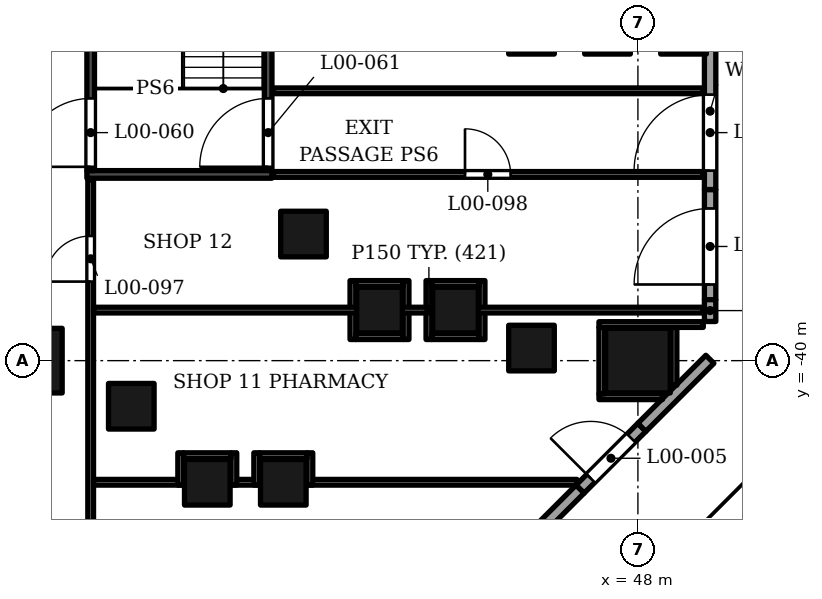
"""IFC4 building model, lengths in metres.
Left out: names, types, materials, properties, quantities, classifications, styles, units other than length and angle.
Written with IfcOpenShell. Run it as: python <this file> out.ifc"""

import sys

from ifc_helpers import new_model, si_unit, direction, frame, frame_2d, origin, origin_2d, place, context, subcontext, project, spatial, rectangle, extrude, element, fill, save


model = new_model("IFC4")
c1 = context("Model", 3, precision=1e-05, world=origin(), true_north=direction((0.0, 1.0)))
c2 = subcontext(c1, "Body", "Model", "MODEL_VIEW")
j1 = project(units=[si_unit("LENGTHUNIT", "METRE"), si_unit("PLANEANGLEUNIT", "RADIAN")], contexts=[c1])
p1 = place(None, origin())
s1 = spatial("IfcSite", under=j1, at=p1, CompositionType="ELEMENT")
p2 = place(p1, origin())
s2 = spatial("IfcBuilding", under=s1, at=p2, CompositionType="ELEMENT")
p3 = place(p2, origin())
s3 = spatial("IfcBuildingStorey", under=s2, at=p3, CompositionType="ELEMENT", Elevation=0.0)
for number, where, z_axis, x_axis in (
    (1, (32.0, -40.0, 0.0), (0.0, 0.0, 1.0), (1.0, 0.0, 0.0)),
    (2, (48.0, -40.0, 0.0), (0.0, 0.0, 1.0), (1.0, 0.0, 0.0)),
):
    element("IfcColumn", number, at=place(p3, frame(where, z_axis=z_axis, x_axis=x_axis)), inside=s3, PredefinedType="COLUMN", context=c2, shape_type="SweptSolid", body=[
        extrude(rectangle(XDim=1.7, YDim=1.7, at=origin_2d()), origin(), (0.0, 0.0, 1.0), 9.0),
    ])
for number, where, z_axis, x_axis in (
    (3, (39.2, -36.669, 0.0), (0.0, 0.0, 1.0), (1.0, 0.0, 0.0)),
    (4, (34.669, -41.2, 0.0), (0.0, 0.0, 1.0), (1.0, 0.0, 0.0)),
    (5, (41.2, -38.669, 0.0), (0.0, 0.0, 1.0), (1.0, 0.0, 0.0)),
    (6, (36.669, -43.2, 0.0), (0.0, 0.0, 1.0), (1.0, 0.0, 0.0)),
    (7, (43.2, -38.669, 0.0), (0.0, 0.0, 1.0), (1.0, 0.0, 0.0)),
    (8, (38.669, -43.2, 0.0), (0.0, 0.0, 1.0), (1.0, 0.0, 0.0)),
    (9, (45.2, -39.669, 0.0), (0.0, 0.0, 1.0), (1.0, 0.0, 0.0)),
    (10, (45.2, -31.333, 0.0), (0.0, 0.0, 1.0), (1.0, 0.0, 0.0)),
    (11, (47.2, -31.333, 0.0), (0.0, 0.0, 1.0), (1.0, 0.0, 0.0)),
    (12, (49.2, -31.333, 0.0), (0.0, 0.0, 1.0), (1.0, 0.0, 0.0)),
):
    element("IfcColumn", number, at=place(p3, frame(where, z_axis=z_axis, x_axis=x_axis)), inside=s3, PredefinedType="COLUMN", context=c2, shape_type="SweptSolid", body=[
        extrude(rectangle(XDim=1.2, YDim=1.2, at=origin_2d()), origin(), (0.0, 0.0, 1.0), 9.0),
    ])
p4 = place(p3, frame((46.477, -43.381, 0.0), z_axis=(0.0, 0.0, 1.0), x_axis=(0.707159853336, 0.707053705054, 0.0)))
e13 = element("IfcWall", 13, at=p4, inside=s3, PredefinedType="ELEMENTEDWALL", context=c2, shape_type="SweptSolid", body=[
    extrude(rectangle(XDim=2.3, YDim=0.3, at=frame_2d((1.15, 0.0))), origin(), (0.0, 0.0, 1.0), 7.6),
])
p5 = place(p4, frame((0.4, 0.0, 0.0)))
e14 = element("IfcOpeningElement", 14, at=p5, cuts=e13, PredefinedType="OPENING", context=c2, shape_type="SweptSolid", body=[
    extrude(rectangle(XDim=1.5, YDim=2.7, at=frame_2d((0.75, 1.35))), frame((0.0, 0.16, 0.0), z_axis=(0.0, -1.0, 0.0), x_axis=(1.0, 0.0, 0.0)), (0.0, 0.0, 1.0), 0.32),
])
p6 = place(p3, frame((44.271, -45.588, 0.0), z_axis=(0.0, 0.0, 1.0), x_axis=(0.707067655068, 0.70714590514, 0.0)))
e15 = element("IfcWall", 15, at=p6, inside=s3, PredefinedType="SOLIDWALL", context=c2, shape_type="SweptSolid", body=[
    extrude(rectangle(XDim=3.12, YDim=0.3, at=frame_2d((1.56, 0.0))), origin(), (0.0, 0.0, 1.0), 7.6),
])
p7 = place(p3, frame((48.104, -41.755, 0.0), z_axis=(0.0, 0.0, 1.0), x_axis=(0.707106781187, 0.707106781187, 0.0)))
e16 = element("IfcWall", 16, at=p7, inside=s3, PredefinedType="SOLIDWALL", context=c2, shape_type="SweptSolid", body=[
    extrude(rectangle(XDim=2.532, YDim=0.3, at=frame_2d((1.266, 0.0))), origin(), (0.0, 0.0, 1.0), 7.6),
])
p8 = place(p3, frame((49.9, -38.396, 0.0), z_axis=(0.0, 0.0, 1.0), x_axis=(0.0, 1.0, 0.0)))
e17 = element("IfcWall", 17, at=p8, inside=s3, PredefinedType="ELEMENTEDWALL", context=c2, shape_type="SweptSolid", body=[
    extrude(rectangle(XDim=2.898, YDim=0.3, at=frame_2d((1.449, 0.0))), origin(), (0.0, 0.0, 1.0), 7.6),
])
p9 = place(p8, frame((0.4, 0.0, 0.0)))
e18 = element("IfcOpeningElement", 18, at=p9, cuts=e17, PredefinedType="OPENING", context=c2, shape_type="SweptSolid", body=[
    extrude(rectangle(XDim=2.0, YDim=2.7, at=frame_2d((1.0, 1.35))), frame((0.0, 0.16, 0.0), z_axis=(0.0, -1.0, 0.0), x_axis=(1.0, 0.0, 0.0)), (0.0, 0.0, 1.0), 0.32),
])
p10 = place(p3, frame((49.9, -35.498, 0.0), z_axis=(0.0, 0.0, 1.0), x_axis=(0.0, 1.0, 0.0)))
e19 = element("IfcWall", 19, at=p10, inside=s3, PredefinedType="ELEMENTEDWALL", context=c2, shape_type="SweptSolid", body=[
    extrude(rectangle(XDim=4.125, YDim=0.3, at=frame_2d((2.062, 0.0))), origin(), (0.0, 0.0, 1.0), 7.6),
])
p11 = place(p10, frame((0.498, 0.0, 0.0)))
e20 = element("IfcOpeningElement", 20, at=p11, cuts=e19, PredefinedType="OPENING", context=c2, shape_type="SweptSolid", body=[
    extrude(rectangle(XDim=2.0, YDim=2.4, at=frame_2d((1.0, 1.2))), frame((0.0, 0.16, 0.0), z_axis=(0.0, -1.0, 0.0), x_axis=(1.0, 0.0, 0.0)), (0.0, 0.0, 1.0), 0.32),
])
p12 = place(p3, frame((49.9, -38.97, 0.0), z_axis=(0.0, 0.0, 1.0), x_axis=(0.0, 1.0, 0.0)))
e21 = element("IfcWall", 21, at=p12, inside=s3, PredefinedType="SOLIDWALL", context=c2, shape_type="SweptSolid", body=[
    extrude(rectangle(XDim=0.574, YDim=0.3, at=frame_2d((0.287, 0.0))), origin(), (0.0, 0.0, 1.0), 7.6),
])
p13 = place(p3, frame((44.042, -45.745, 9.0), z_axis=(0.0, 0.0, 1.0), x_axis=(0.7071215324, 0.707092029666, 0.0)))
e22 = element("IfcWall", 22, at=p13, inside=s3, PredefinedType="PARAPET", context=c2, shape_type="SweptSolid", body=[
    extrude(rectangle(XDim=8.275, YDim=0.3, at=frame_2d((4.138, 0.0))), origin(), (0.0, 0.0, 1.0), 1.1),
])
p14 = place(p3, frame((49.85, -39.79, 9.0), z_axis=(0.0, 0.0, 1.0), x_axis=(0.0, 1.0, 0.0)))
e23 = element("IfcWall", 23, at=p14, inside=s3, PredefinedType="PARAPET", context=c2, shape_type="SweptSolid", body=[
    extrude(rectangle(XDim=14.698, YDim=0.3, at=frame_2d((7.349, 0.0))), origin(), (0.0, 0.0, 1.0), 1.1),
])
p15 = place(p3, frame((33.5, -35.1, 0.0), z_axis=(0.0, 0.0, 1.0), x_axis=(1.0, 0.0, 0.0)))
e24 = element("IfcWall", 24, at=p15, inside=s3, PredefinedType="SOLIDWALL", context=c2, shape_type="SweptSolid", body=[
    extrude(rectangle(XDim=4.87, YDim=0.2, at=frame_2d((2.435, 0.0))), origin(), (0.0, 0.0, 1.0), 8.5),
])
p16 = place(p3, frame((33.6, -35.0, 0.0), z_axis=(0.0, 0.0, 1.0), x_axis=(0.0, 1.0, 0.0)))
e25 = element("IfcWall", 25, at=p16, inside=s3, PredefinedType="SOLIDWALL", context=c2, shape_type="SweptSolid", body=[
    extrude(rectangle(XDim=6.65, YDim=0.2, at=frame_2d((3.325, 0.0))), origin(), (0.0, 0.0, 1.0), 8.5),
])
p17 = place(p16, frame((0.1, 0.0, 0.0)))
e26 = element("IfcOpeningElement", 26, at=p17, cuts=e25, PredefinedType="OPENING", context=c2, shape_type="SweptSolid", body=[
    extrude(rectangle(XDim=1.8, YDim=2.4, at=frame_2d((0.9, 1.2))), frame((0.0, 0.11, 0.0), z_axis=(0.0, -1.0, 0.0), x_axis=(1.0, 0.0, 0.0)), (0.0, 0.0, 1.0), 0.22),
])
p18 = place(p3, frame((38.27, -35.0, 0.0), z_axis=(0.0, 0.0, 1.0), x_axis=(0.0, 1.0, 0.0)))
e27 = element("IfcWall", 27, at=p18, inside=s3, PredefinedType="SOLIDWALL", context=c2, shape_type="SweptSolid", body=[
    extrude(rectangle(XDim=6.65, YDim=0.2, at=frame_2d((3.325, 0.0))), origin(), (0.0, 0.0, 1.0), 8.5),
])
p19 = place(p18, frame((0.1, 0.0, 0.0)))
e28 = element("IfcOpeningElement", 28, at=p19, cuts=e27, PredefinedType="OPENING", context=c2, shape_type="SweptSolid", body=[
    extrude(rectangle(XDim=1.8, YDim=2.4, at=frame_2d((0.9, 1.2))), frame((0.0, 0.11, 0.0), z_axis=(0.0, -1.0, 0.0), x_axis=(1.0, 0.0, 0.0)), (0.0, 0.0, 1.0), 0.22),
])
p20 = place(p3, frame((33.6, -44.6, 0.0), z_axis=(0.0, 0.0, 1.0), x_axis=(0.0, 1.0, 0.0)))
e29 = element("IfcWall", 29, at=p20, inside=s3, PredefinedType="PARTITIONING", context=c2, shape_type="SweptSolid", body=[
    extrude(rectangle(XDim=9.36, YDim=0.15, at=frame_2d((4.68, 0.0))), origin(), (0.0, 0.0, 1.0), 7.3),
])
p21 = place(p20, frame((6.68, 0.0, 0.0)))
e30 = element("IfcOpeningElement", 30, at=p21, cuts=e29, PredefinedType="OPENING", context=c2, shape_type="SweptSolid", body=[
    extrude(rectangle(XDim=1.2, YDim=2.1, at=frame_2d((0.6, 1.05))), frame((0.0, 0.085, 0.0), z_axis=(0.0, -1.0, 0.0), x_axis=(1.0, 0.0, 0.0)), (0.0, 0.0, 1.0), 0.17),
])
p22 = place(p3, frame((33.675, -43.2, 0.0), z_axis=(0.0, 0.0, 1.0), x_axis=(1.0, 0.0, 0.0)))
e31 = element("IfcWall", 31, at=p22, inside=s3, PredefinedType="PARTITIONING", context=c2, shape_type="SweptSolid", body=[
    extrude(rectangle(XDim=2.394, YDim=0.15, at=frame_2d((1.197, 0.0))), origin(), (0.0, 0.0, 1.0), 8.5),
])
p23 = place(p3, frame((35.969, -43.275, 0.0), z_axis=(0.0, 0.0, 1.0), x_axis=(0.0, 1.0, 0.0)))
e32 = element("IfcWall", 32, at=p23, inside=s3, PredefinedType="PARTITIONING", context=c2, shape_type="SweptSolid", body=[
    extrude(rectangle(XDim=0.85, YDim=0.15, at=frame_2d((0.425, 0.0))), origin(), (0.0, 0.0, 1.0), 8.5),
])
p24 = place(p3, frame((37.269, -43.2, 0.0), z_axis=(0.0, 0.0, 1.0), x_axis=(1.0, 0.0, 0.0)))
e33 = element("IfcWall", 33, at=p24, inside=s3, PredefinedType="PARTITIONING", context=c2, shape_type="SweptSolid", body=[
    extrude(rectangle(XDim=0.8, YDim=0.15, at=frame_2d((0.4, 0.0))), origin(), (0.0, 0.0, 1.0), 8.5),
])
for number, where, z_axis, x_axis in (
    (34, (37.369, -43.275, 0.0), (0.0, 0.0, 1.0), (0.0, 1.0, 0.0)),
    (35, (37.969, -43.275, 0.0), (0.0, 0.0, 1.0), (0.0, 1.0, 0.0)),
):
    element("IfcWall", number, at=place(p3, frame(where, z_axis=z_axis, x_axis=x_axis)), inside=s3, PredefinedType="PARTITIONING", context=c2, shape_type="SweptSolid", body=[
        extrude(rectangle(XDim=0.85, YDim=0.15, at=frame_2d((0.425, 0.0))), origin(), (0.0, 0.0, 1.0), 8.5),
    ])
p25 = place(p3, frame((39.269, -43.2, 0.0), z_axis=(0.0, 0.0, 1.0), x_axis=(1.0, 0.0, 0.0)))
e36 = element("IfcWall", 36, at=p25, inside=s3, PredefinedType="PARTITIONING", context=c2, shape_type="SweptSolid", body=[
    extrude(rectangle(XDim=7.127, YDim=0.15, at=frame_2d((3.563, 0.0))), origin(), (0.0, 0.0, 1.0), 7.6),
])
p26 = place(p3, frame((39.369, -43.275, 0.0), z_axis=(0.0, 0.0, 1.0), x_axis=(0.0, 1.0, 0.0)))
e37 = element("IfcWall", 37, at=p26, inside=s3, PredefinedType="PARTITIONING", context=c2, shape_type="SweptSolid", body=[
    extrude(rectangle(XDim=0.85, YDim=0.15, at=frame_2d((0.425, 0.0))), origin(), (0.0, 0.0, 1.0), 8.5),
])
for number, where, z_axis, x_axis in (
    (38, (36.044, -42.5, 0.0), (0.0, 0.0, 1.0), (1.0, 0.0, 0.0)),
    (39, (38.044, -42.5, 0.0), (0.0, 0.0, 1.0), (1.0, 0.0, 0.0)),
):
    element("IfcWall", number, at=place(p3, frame(where, z_axis=z_axis, x_axis=x_axis)), inside=s3, PredefinedType="PARTITIONING", context=c2, shape_type="SweptSolid", body=[
        extrude(rectangle(XDim=1.25, YDim=0.15, at=frame_2d((0.625, 0.0))), origin(), (0.0, 0.0, 1.0), 8.5),
    ])
p27 = place(p3, frame((46.975, -40.95, 0.0), z_axis=(0.0, 0.0, 1.0), x_axis=(1.0, 0.0, 0.0)))
e40 = element("IfcWall", 40, at=p27, inside=s3, PredefinedType="PARTITIONING", context=c2, shape_type="SweptSolid", body=[
    extrude(rectangle(XDim=1.671, YDim=0.15, at=frame_2d((0.835, 0.0))), origin(), (0.0, 0.0, 1.0), 7.6),
])
p28 = place(p3, frame((47.05, -40.875, 0.0), z_axis=(0.0, 0.0, 1.0), x_axis=(0.0, 1.0, 0.0)))
e41 = element("IfcWall", 41, at=p28, inside=s3, PredefinedType="PARTITIONING", context=c2, shape_type="SweptSolid", body=[
    extrude(rectangle(XDim=1.75, YDim=0.15, at=frame_2d((0.875, 0.0))), origin(), (0.0, 0.0, 1.0), 7.6),
])
p29 = place(p3, frame((48.95, -40.646, 0.0), z_axis=(0.0, 0.0, 1.0), x_axis=(0.0, 1.0, 0.0)))
e42 = element("IfcWall", 42, at=p29, inside=s3, PredefinedType="PARTITIONING", context=c2, shape_type="SweptSolid", body=[
    extrude(rectangle(XDim=1.521, YDim=0.15, at=frame_2d((0.76, 0.0))), origin(), (0.0, 0.0, 1.0), 8.5),
])
p30 = place(p3, frame((40.5, -39.444, 0.0), z_axis=(0.0, 0.0, 1.0), x_axis=(0.0, 1.0, 0.0)))
e43 = element("IfcWall", 43, at=p30, inside=s3, PredefinedType="PARTITIONING", context=c2, shape_type="SweptSolid", body=[
    extrude(rectangle(XDim=1.55, YDim=0.15, at=frame_2d((0.775, 0.0))), origin(), (0.0, 0.0, 1.0), 8.5),
])
p31 = place(p3, frame((40.575, -39.369, 0.0), z_axis=(0.0, 0.0, 1.0), x_axis=(1.0, 0.0, 0.0)))
e44 = element("IfcWall", 44, at=p31, inside=s3, PredefinedType="PARTITIONING", context=c2, shape_type="SweptSolid", body=[
    extrude(rectangle(XDim=1.25, YDim=0.15, at=frame_2d((0.625, 0.0))), origin(), (0.0, 0.0, 1.0), 8.5),
])
for number, where, z_axis, x_axis in (
    (45, (41.9, -39.444, 0.0), (0.0, 0.0, 1.0), (0.0, 1.0, 0.0)),
    (46, (42.5, -39.444, 0.0), (0.0, 0.0, 1.0), (0.0, 1.0, 0.0)),
):
    element("IfcWall", number, at=place(p3, frame(where, z_axis=z_axis, x_axis=x_axis)), inside=s3, PredefinedType="PARTITIONING", context=c2, shape_type="SweptSolid", body=[
        extrude(rectangle(XDim=1.55, YDim=0.15, at=frame_2d((0.775, 0.0))), origin(), (0.0, 0.0, 1.0), 8.5),
    ])
p32 = place(p3, frame((42.575, -39.369, 0.0), z_axis=(0.0, 0.0, 1.0), x_axis=(1.0, 0.0, 0.0)))
e47 = element("IfcWall", 47, at=p32, inside=s3, PredefinedType="PARTITIONING", context=c2, shape_type="SweptSolid", body=[
    extrude(rectangle(XDim=1.25, YDim=0.15, at=frame_2d((0.625, 0.0))), origin(), (0.0, 0.0, 1.0), 8.5),
])
p33 = place(p3, frame((43.9, -39.444, 0.0), z_axis=(0.0, 0.0, 1.0), x_axis=(0.0, 1.0, 0.0)))
e48 = element("IfcWall", 48, at=p33, inside=s3, PredefinedType="PARTITIONING", context=c2, shape_type="SweptSolid", body=[
    extrude(rectangle(XDim=1.55, YDim=0.15, at=frame_2d((0.775, 0.0))), origin(), (0.0, 0.0, 1.0), 8.5),
])
p34 = place(p3, frame((46.975, -39.05, 0.0), z_axis=(0.0, 0.0, 1.0), x_axis=(1.0, 0.0, 0.0)))
e49 = element("IfcWall", 49, at=p34, inside=s3, PredefinedType="PARTITIONING", context=c2, shape_type="SweptSolid", body=[
    extrude(rectangle(XDim=2.745, YDim=0.15, at=frame_2d((1.373, 0.0))), origin(), (0.0, 0.0, 1.0), 7.6),
])
p35 = place(p3, frame((33.675, -38.67, 0.0), z_axis=(0.0, 0.0, 1.0), x_axis=(1.0, 0.0, 0.0)))
e50 = element("IfcWall", 50, at=p35, inside=s3, PredefinedType="PARTITIONING", context=c2, shape_type="SweptSolid", body=[
    extrude(rectangle(XDim=6.925, YDim=0.15, at=frame_2d((3.462, 0.0))), origin(), (0.0, 0.0, 1.0), 8.5),
])
p36 = place(p3, frame((41.8, -38.67, 0.0), z_axis=(0.0, 0.0, 1.0), x_axis=(1.0, 0.0, 0.0)))
e51 = element("IfcWall", 51, at=p36, inside=s3, PredefinedType="PARTITIONING", context=c2, shape_type="SweptSolid", body=[
    extrude(rectangle(XDim=0.8, YDim=0.15, at=frame_2d((0.4, 0.0))), origin(), (0.0, 0.0, 1.0), 8.5),
])
p37 = place(p3, frame((43.8, -38.67, 0.0), z_axis=(0.0, 0.0, 1.0), x_axis=(1.0, 0.0, 0.0)))
e52 = element("IfcWall", 52, at=p37, inside=s3, PredefinedType="PARTITIONING", context=c2, shape_type="SweptSolid", body=[
    extrude(rectangle(XDim=5.92, YDim=0.15, at=frame_2d((2.96, 0.0))), origin(), (0.0, 0.0, 1.0), 7.6),
])
for number, where, z_axis, x_axis in (
    (53, (40.575, -37.969, 0.0), (0.0, 0.0, 1.0), (1.0, 0.0, 0.0)),
    (54, (42.575, -37.969, 0.0), (0.0, 0.0, 1.0), (1.0, 0.0, 0.0)),
):
    element("IfcWall", number, at=place(p3, frame(where, z_axis=z_axis, x_axis=x_axis)), inside=s3, PredefinedType="PARTITIONING", context=c2, shape_type="SweptSolid", body=[
        extrude(rectangle(XDim=1.25, YDim=0.15, at=frame_2d((0.625, 0.0))), origin(), (0.0, 0.0, 1.0), 8.5),
    ])
p38 = place(p3, frame((38.41, -35.101, 0.0), z_axis=(0.0, 0.0, 1.0), x_axis=(1.0, 0.0, 0.0)))
e55 = element("IfcWall", 55, at=p38, inside=s3, PredefinedType="PARTITIONING", context=c2, shape_type="SweptSolid", body=[
    extrude(rectangle(XDim=11.31, YDim=0.151, at=frame_2d((5.655, 0.0))), origin(), (0.0, 0.0, 1.0), 7.6),
])
p39 = place(p38, frame((5.04, 0.0, 0.0)))
e56 = element("IfcOpeningElement", 56, at=p39, cuts=e55, PredefinedType="OPENING", context=c2, shape_type="SweptSolid", body=[
    extrude(rectangle(XDim=1.2, YDim=2.1, at=frame_2d((0.6, 1.05))), frame((0.0, 0.085, 0.0), z_axis=(0.0, -1.0, 0.0), x_axis=(1.0, 0.0, 0.0)), (0.0, 0.0, 1.0), 0.171),
])
p40 = place(p3, frame((38.41, -32.9, 0.0), z_axis=(0.0, 0.0, 1.0), x_axis=(1.0, 0.0, 0.0)))
e57 = element("IfcWall", 57, at=p40, inside=s3, PredefinedType="PARTITIONING", context=c2, shape_type="SweptSolid", body=[
    extrude(rectangle(XDim=11.31, YDim=0.15, at=frame_2d((5.655, 0.0))), origin(), (0.0, 0.0, 1.0), 7.6),
])
p41 = place(p5, origin())
e58 = element("IfcDoor", 58, at=p41, inside=s3, OperationType="DOUBLE_DOOR_SINGLE_SWING", PredefinedType="DOOR", context=c2, shape_type="SweptSolid", body=[
    extrude(rectangle(XDim=1.5, YDim=2.7, at=frame_2d((0.75, 1.35))), frame((0.0, 0.025, 0.0), z_axis=(0.0, -1.0, 0.0), x_axis=(1.0, 0.0, 0.0)), (0.0, 0.0, 1.0), 0.05),
])
fill(e14, e58)
p42 = place(p9, origin())
e59 = element("IfcDoor", 59, at=p42, inside=s3, OperationType="DOUBLE_DOOR_SINGLE_SWING", PredefinedType="DOOR", context=c2, shape_type="SweptSolid", body=[
    extrude(rectangle(XDim=2.0, YDim=2.7, at=frame_2d((1.0, 1.35))), frame((0.0, 0.025, 0.0), z_axis=(0.0, -1.0, 0.0), x_axis=(1.0, 0.0, 0.0)), (0.0, 0.0, 1.0), 0.05),
])
fill(e18, e59)
p43 = place(p11, origin())
e60 = element("IfcDoor", 60, at=p43, inside=s3, OperationType="DOUBLE_DOOR_SINGLE_SWING", PredefinedType="DOOR", context=c2, shape_type="SweptSolid", body=[
    extrude(rectangle(XDim=2.0, YDim=2.4, at=frame_2d((1.0, 1.2))), frame((0.0, 0.025, 0.0), z_axis=(0.0, -1.0, 0.0), x_axis=(1.0, 0.0, 0.0)), (0.0, 0.0, 1.0), 0.05),
])
fill(e20, e60)
p44 = place(p17, origin())
e61 = element("IfcDoor", 61, at=p44, inside=s3, OperationType="DOUBLE_DOOR_SINGLE_SWING", PredefinedType="DOOR", context=c2, shape_type="SweptSolid", body=[
    extrude(rectangle(XDim=1.8, YDim=2.4, at=frame_2d((0.9, 1.2))), frame((0.0, 0.025, 0.0), z_axis=(0.0, -1.0, 0.0), x_axis=(1.0, 0.0, 0.0)), (0.0, 0.0, 1.0), 0.05),
])
fill(e26, e61)
p45 = place(p19, origin())
e62 = element("IfcDoor", 62, at=p45, inside=s3, OperationType="DOUBLE_DOOR_SINGLE_SWING", PredefinedType="DOOR", context=c2, shape_type="SweptSolid", body=[
    extrude(rectangle(XDim=1.8, YDim=2.4, at=frame_2d((0.9, 1.2))), frame((0.0, 0.025, 0.0), z_axis=(0.0, -1.0, 0.0), x_axis=(1.0, 0.0, 0.0)), (0.0, 0.0, 1.0), 0.05),
])
fill(e28, e62)
p46 = place(p21, origin())
e63 = element("IfcDoor", 63, at=p46, inside=s3, OperationType="SINGLE_SWING_LEFT", PredefinedType="DOOR", context=c2, shape_type="SweptSolid", body=[
    extrude(rectangle(XDim=1.2, YDim=2.1, at=frame_2d((0.6, 1.05))), frame((0.0, 0.025, 0.0), z_axis=(0.0, -1.0, 0.0), x_axis=(1.0, 0.0, 0.0)), (0.0, 0.0, 1.0), 0.05),
])
fill(e30, e63)
p47 = place(p39, origin())
e64 = element("IfcDoor", 64, at=p47, inside=s3, OperationType="SINGLE_SWING_LEFT", PredefinedType="DOOR", context=c2, shape_type="SweptSolid", body=[
    extrude(rectangle(XDim=1.2, YDim=2.1, at=frame_2d((0.6, 1.05))), frame((0.0, 0.025, 0.0), z_axis=(0.0, -1.0, 0.0), x_axis=(1.0, 0.0, 0.0)), (0.0, 0.0, 1.0), 0.05),
])
fill(e56, e64)
save(model, sys.argv[1])
